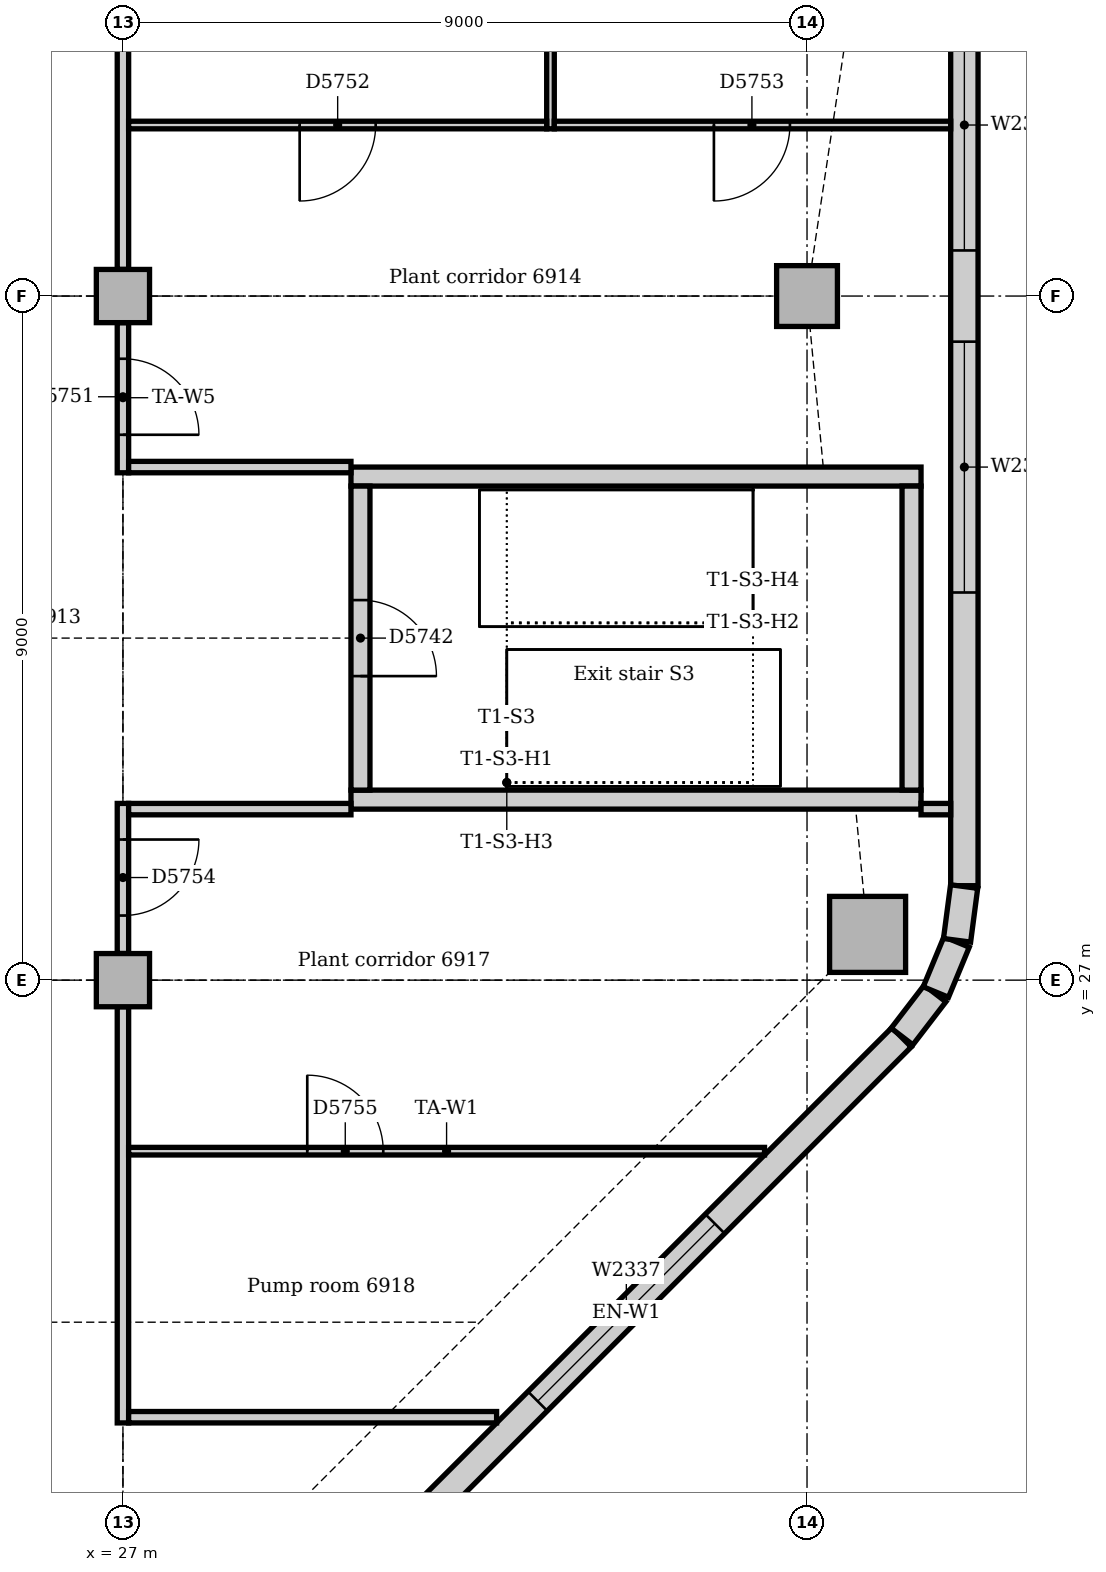
"""IFC4 building model, lengths in metres.
Left out: names, types, materials, properties, quantities, classifications, styles, units other than length and angle.
Written with IfcOpenShell. Run it as: python <this file> out.ifc"""

import sys

from ifc_helpers import new_model, si_unit, direction, frame, frame_2d, origin, origin_2d, place, context, subcontext, project, spatial, rectangle, extrude, element, fill, save


model = new_model("IFC4")
c1 = context("Model", 3, precision=1e-05, world=origin(), true_north=direction((0.0, 1.0)))
c2 = subcontext(c1, "Body", "Model", "MODEL_VIEW")
j1 = project(units=[si_unit("LENGTHUNIT", "METRE"), si_unit("PLANEANGLEUNIT", "RADIAN")], contexts=[c1])
p1 = place(None, origin())
s1 = spatial("IfcSite", under=j1, at=p1, CompositionType="ELEMENT")
p2 = place(p1, origin())
s2 = spatial("IfcBuilding", under=s1, at=p2, CompositionType="ELEMENT")
p3 = place(p2, frame((0.0, 0.0, 291.0)))
s3 = spatial("IfcBuildingStorey", under=s2, at=p3, CompositionType="ELEMENT", Elevation=291.0)
for number, where, z_axis, x_axis in (
    (1, (30.0, 29.375, 0.0), (0.0, 0.0, 1.0), (1.0, 0.0, 0.0)),
    (2, (37.5, 33.625, 0.0), (0.0, 0.0, 1.0), (-1.0, 0.0, 0.0)),
):
    element("IfcWall", number, at=place(p3, frame(where, z_axis=z_axis, x_axis=x_axis)), inside=s3, PredefinedType="SOLIDWALL", context=c2, shape_type="SweptSolid", body=[
        extrude(rectangle(XDim=7.5, YDim=0.25, at=frame_2d((3.75, 0.0))), origin(), (0.0, 0.0, 1.0), 6.55),
    ])
p4 = place(p3, frame((37.375, 29.5, 0.0), z_axis=(0.0, 0.0, 1.0), x_axis=(0.0, 1.0, 0.0)))
e3 = element("IfcWall", 3, at=p4, inside=s3, PredefinedType="SOLIDWALL", context=c2, shape_type="SweptSolid", body=[
    extrude(rectangle(XDim=4.0, YDim=0.25, at=frame_2d((2.0, 0.0))), origin(), (0.0, 0.0, 1.0), 6.55),
])
p5 = place(p3, frame((30.125, 33.5, 0.0), z_axis=(0.0, 0.0, 1.0), x_axis=(0.0, -1.0, 0.0)))
e4 = element("IfcWall", 4, at=p5, inside=s3, PredefinedType="SOLIDWALL", context=c2, shape_type="SweptSolid", body=[
    extrude(rectangle(XDim=4.0, YDim=0.25, at=frame_2d((2.0, 0.0))), origin(), (0.0, 0.0, 1.0), 6.55),
])
p6 = place(p5, frame((1.5, 0.0, 0.0)))
e5 = element("IfcOpeningElement", 5, at=p6, cuts=e4, PredefinedType="OPENING", context=c2, shape_type="SweptSolid", body=[
    extrude(rectangle(XDim=1.0, YDim=2.1, at=frame_2d((0.5, 1.05))), frame((0.0, 0.135, 0.0), z_axis=(0.0, -1.0, 0.0), x_axis=(1.0, 0.0, 0.0)), (0.0, 0.0, 1.0), 0.27),
])
p7 = place(p3, frame((36.797, 27.602, 0.0), z_axis=(0.0, 0.0, 1.0), x_axis=(1.0, 0.0, 0.0)))
e6 = element("IfcColumn", 6, at=p7, inside=s3, PredefinedType="COLUMN", context=c2, shape_type="SweptSolid", body=[
    extrude(rectangle(XDim=1.0, YDim=1.0, at=origin_2d()), origin(), (0.0, 0.0, 1.0), 6.55),
])
p8 = place(p3, frame((36.0, 36.0, 0.0), z_axis=(0.0, 0.0, 1.0), x_axis=(1.0, 0.0, 0.0)))
e7 = element("IfcColumn", 7, at=p8, inside=s3, PredefinedType="COLUMN", context=c2, shape_type="SweptSolid", body=[
    extrude(rectangle(XDim=0.8, YDim=0.8, at=origin_2d()), origin(), (0.0, 0.0, 1.0), 6.55),
])
for number, where, z_axis, x_axis in (
    (8, (27.0, 27.0, 0.0), (0.0, 0.0, 1.0), (1.0, 0.0, 0.0)),
    (9, (27.0, 36.0, 0.0), (0.0, 0.0, 1.0), (1.0, 0.0, 0.0)),
):
    element("IfcColumn", number, at=place(p3, frame(where, z_axis=z_axis, x_axis=x_axis)), inside=s3, PredefinedType="COLUMN", context=c2, shape_type="SweptSolid", body=[
        extrude(rectangle(XDim=0.7, YDim=0.7, at=origin_2d()), origin(), (0.0, 0.0, 1.0), 6.55),
    ])
p9 = place(p3, frame((30.001, 19.006, 0.0), z_axis=(0.0, 0.0, 1.0), x_axis=(0.707106781187, 0.707106781187, 0.0)))
e10 = element("IfcWall", 10, at=p9, inside=s3, PredefinedType="STANDARD", context=c2, shape_type="SweptSolid", body=[
    extrude(rectangle(XDim=10.243, YDim=0.36, at=frame_2d((5.121, 0.0))), origin(), (0.0, 0.0, 1.0), 6.55),
])
p10 = place(p9, frame((3.471, 0.0, 0.9)))
e11 = element("IfcOpeningElement", 11, at=p10, cuts=e10, PredefinedType="OPENING", context=c2, shape_type="SweptSolid", body=[
    extrude(rectangle(XDim=3.3, YDim=2.2, at=frame_2d((1.65, 1.1))), frame((0.0, 0.19, 0.0), z_axis=(0.0, -1.0, 0.0), x_axis=(1.0, 0.0, 0.0)), (0.0, 0.0, 1.0), 0.38),
])
p11 = place(p3, frame((38.07, 28.243, 0.0), z_axis=(0.0, 0.0, 1.0), x_axis=(0.0, 1.0, 0.0)))
e12 = element("IfcWall", 12, at=p11, inside=s3, PredefinedType="STANDARD", context=c2, shape_type="SweptSolid", body=[
    extrude(rectangle(XDim=24.515, YDim=0.36, at=frame_2d((12.257, 0.0))), origin(), (0.0, 0.0, 1.0), 6.55),
])
p12 = place(p11, frame((3.857, 0.0, 0.9)))
e13 = element("IfcOpeningElement", 13, at=p12, cuts=e12, PredefinedType="OPENING", context=c2, shape_type="SweptSolid", body=[
    extrude(rectangle(XDim=3.3, YDim=2.2, at=frame_2d((1.65, 1.1))), frame((0.0, 0.19, 0.0), z_axis=(0.0, -1.0, 0.0), x_axis=(1.0, 0.0, 0.0)), (0.0, 0.0, 1.0), 0.38),
])
p13 = place(p11, frame((8.357, 0.0, 0.9)))
e14 = element("IfcOpeningElement", 14, at=p13, cuts=e12, PredefinedType="OPENING", context=c2, shape_type="SweptSolid", body=[
    extrude(rectangle(XDim=3.3, YDim=2.2, at=frame_2d((1.65, 1.1))), frame((0.0, 0.19, 0.0), z_axis=(0.0, -1.0, 0.0), x_axis=(1.0, 0.0, 0.0)), (0.0, 0.0, 1.0), 0.38),
])
p14 = place(p11, frame((12.857, 0.0, 0.9)))
e15 = element("IfcOpeningElement", 15, at=p14, cuts=e12, PredefinedType="OPENING", context=c2, shape_type="SweptSolid", body=[
    extrude(rectangle(XDim=3.3, YDim=2.2, at=frame_2d((1.65, 1.1))), frame((0.0, 0.19, 0.0), z_axis=(0.0, -1.0, 0.0), x_axis=(1.0, 0.0, 0.0)), (0.0, 0.0, 1.0), 0.38),
])
p15 = place(p11, frame((17.357, 0.0, 0.9)))
e16 = element("IfcOpeningElement", 16, at=p15, cuts=e12, PredefinedType="OPENING", context=c2, shape_type="SweptSolid", body=[
    extrude(rectangle(XDim=3.3, YDim=2.2, at=frame_2d((1.65, 1.1))), frame((0.0, 0.19, 0.0), z_axis=(0.0, -1.0, 0.0), x_axis=(1.0, 0.0, 0.0)), (0.0, 0.0, 1.0), 0.38),
])
p16 = place(p3, frame((37.25, 26.259, 0.0), z_axis=(0.0, 0.0, 1.0), x_axis=(0.608802368033, 0.793321924995, 0.0)))
e17 = element("IfcWall", 17, at=p16, inside=s3, PredefinedType="STANDARD", context=c2, shape_type="SweptSolid", body=[
    extrude(rectangle(XDim=0.713, YDim=0.36, at=frame_2d((0.357, 0.0))), origin(), (0.0, 0.0, 1.0), 6.55),
])
for number, where, z_axis, x_axis in (
    (18, (37.695, 26.844, 0.0), (0.0, 0.0, 1.0), (0.383, 0.924, 0.0)),
    (19, (37.974, 27.524, 0.0), (0.0, 0.0, 1.0), (0.131, 0.991, 0.0)),
):
    element("IfcWall", number, at=place(p3, frame(where, z_axis=z_axis, x_axis=x_axis)), inside=s3, PredefinedType="STANDARD", context=c2, shape_type="SweptSolid", body=[
        extrude(rectangle(XDim=0.713, YDim=0.36, at=frame_2d((0.356, 0.0))), origin(), (0.0, 0.0, 1.0), 6.55),
    ])
p17 = place(p3, frame((27.0, 33.675, 0.0), z_axis=(0.0, 0.0, 1.0), x_axis=(0.0, 1.0, 0.0)))
e20 = element("IfcWall", 20, at=p17, inside=s3, PredefinedType="PARTITIONING", context=c2, shape_type="SweptSolid", body=[
    extrude(rectangle(XDim=1.975, YDim=0.15, at=frame_2d((0.988, 0.0))), origin(), (0.0, 0.0, 1.0), 5.75),
])
p18 = place(p17, frame((0.5, 0.0, 0.0)))
e21 = element("IfcOpeningElement", 21, at=p18, cuts=e20, PredefinedType="OPENING", context=c2, shape_type="SweptSolid", body=[
    extrude(rectangle(XDim=1.0, YDim=2.1, at=frame_2d((0.5, 1.05))), frame((0.0, 0.085, 0.0), z_axis=(0.0, -1.0, 0.0), x_axis=(1.0, 0.0, 0.0)), (0.0, 0.0, 1.0), 0.17),
])
p19 = place(p3, frame((27.0, 36.35, 0.0), z_axis=(0.0, 0.0, 1.0), x_axis=(0.0, 1.0, 0.0)))
e22 = element("IfcWall", 22, at=p19, inside=s3, PredefinedType="PARTITIONING", context=c2, shape_type="SweptSolid", body=[
    extrude(rectangle(XDim=7.4, YDim=0.15, at=frame_2d((3.7, 0.0))), origin(), (0.0, 0.0, 1.0), 6.1),
])
p20 = place(p3, frame((27.0, 21.175, 0.0), z_axis=(0.0, 0.0, 1.0), x_axis=(0.0, 1.0, 0.0)))
e23 = element("IfcWall", 23, at=p20, inside=s3, PredefinedType="PARTITIONING", context=c2, shape_type="SweptSolid", body=[
    extrude(rectangle(XDim=5.475, YDim=0.15, at=frame_2d((2.737, 0.0))), origin(), (0.0, 0.0, 1.0), 5.75),
])
p21 = place(p3, frame((27.0, 27.35, 0.0), z_axis=(0.0, 0.0, 1.0), x_axis=(0.0, 1.0, 0.0)))
e24 = element("IfcWall", 24, at=p21, inside=s3, PredefinedType="PARTITIONING", context=c2, shape_type="SweptSolid", body=[
    extrude(rectangle(XDim=1.975, YDim=0.15, at=frame_2d((0.988, 0.0))), origin(), (0.0, 0.0, 1.0), 5.75),
])
p22 = place(p21, frame((0.5, 0.0, 0.0)))
e25 = element("IfcOpeningElement", 25, at=p22, cuts=e24, PredefinedType="OPENING", context=c2, shape_type="SweptSolid", body=[
    extrude(rectangle(XDim=1.0, YDim=2.1, at=frame_2d((0.5, 1.05))), frame((0.0, 0.085, 0.0), z_axis=(0.0, -1.0, 0.0), x_axis=(1.0, 0.0, 0.0)), (0.0, 0.0, 1.0), 0.17),
])
p23 = place(p3, frame((27.075, 21.25, 0.0), z_axis=(0.0, 0.0, 1.0), x_axis=(1.0, 0.0, 0.0)))
e26 = element("IfcWall", 26, at=p23, inside=s3, PredefinedType="PARTITIONING", context=c2, shape_type="SweptSolid", body=[
    extrude(rectangle(XDim=4.841, YDim=0.15, at=frame_2d((2.421, 0.0))), origin(), (0.0, 0.0, 1.0), 6.55),
])
for number, where, z_axis, x_axis in (
    (27, (27.075, 29.25, 0.0), (0.0, 0.0, 1.0), (1.0, 0.0, 0.0)),
    (28, (27.075, 33.75, 0.0), (0.0, 0.0, 1.0), (1.0, 0.0, 0.0)),
):
    element("IfcWall", number, at=place(p3, frame(where, z_axis=z_axis, x_axis=x_axis)), inside=s3, PredefinedType="PARTITIONING", context=c2, shape_type="SweptSolid", body=[
        extrude(rectangle(XDim=2.925, YDim=0.15, at=frame_2d((1.462, 0.0))), origin(), (0.0, 0.0, 1.0), 6.55),
    ])
p24 = place(p3, frame((37.5, 29.25, 0.0), z_axis=(0.0, 0.0, 1.0), x_axis=(1.0, 0.0, 0.0)))
e29 = element("IfcWall", 29, at=p24, inside=s3, PredefinedType="PARTITIONING", context=c2, shape_type="SweptSolid", body=[
    extrude(rectangle(XDim=0.39, YDim=0.15, at=frame_2d((0.195, 0.0))), origin(), (0.0, 0.0, 1.0), 6.55),
])
p25 = place(p3, frame((32.625, 38.2, 0.0), z_axis=(0.0, 0.0, 1.0), x_axis=(0.0, 1.0, 0.0)))
e30 = element("IfcWall", 30, at=p25, inside=s3, PredefinedType="PARTITIONING", context=c2, shape_type="SweptSolid", body=[
    extrude(rectangle(XDim=20.966, YDim=0.1, at=frame_2d((10.483, 0.0))), origin(), (0.0, 0.0, 1.0), 6.55),
])
p26 = place(p3, frame((27.075, 38.25, 0.0), z_axis=(0.0, 0.0, 1.0), x_axis=(1.0, 0.0, 0.0)))
e31 = element("IfcWall", 31, at=p26, inside=s3, PredefinedType="PARTITIONING", context=c2, shape_type="SweptSolid", body=[
    extrude(rectangle(XDim=5.5, YDim=0.1, at=frame_2d((2.75, 0.0))), origin(), (0.0, 0.0, 1.0), 6.55),
])
p27 = place(p26, frame((2.25, 0.0, 0.0)))
e32 = element("IfcOpeningElement", 32, at=p27, cuts=e31, PredefinedType="OPENING", context=c2, shape_type="SweptSolid", body=[
    extrude(rectangle(XDim=1.0, YDim=2.1, at=frame_2d((0.5, 1.05))), frame((0.0, 0.06, 0.0), z_axis=(0.0, -1.0, 0.0), x_axis=(1.0, 0.0, 0.0)), (0.0, 0.0, 1.0), 0.12),
])
p28 = place(p3, frame((32.675, 38.25, 0.0), z_axis=(0.0, 0.0, 1.0), x_axis=(1.0, 0.0, 0.0)))
e33 = element("IfcWall", 33, at=p28, inside=s3, PredefinedType="PARTITIONING", context=c2, shape_type="SweptSolid", body=[
    extrude(rectangle(XDim=5.215, YDim=0.1, at=frame_2d((2.607, 0.0))), origin(), (0.0, 0.0, 1.0), 6.55),
])
p29 = place(p28, frame((2.1, 0.0, 0.0)))
e34 = element("IfcOpeningElement", 34, at=p29, cuts=e33, PredefinedType="OPENING", context=c2, shape_type="SweptSolid", body=[
    extrude(rectangle(XDim=1.0, YDim=2.1, at=frame_2d((0.5, 1.05))), frame((0.0, 0.06, 0.0), z_axis=(0.0, -1.0, 0.0), x_axis=(1.0, 0.0, 0.0)), (0.0, 0.0, 1.0), 0.12),
])
p30 = place(p3, frame((27.075, 24.75, 0.0), z_axis=(0.0, 0.0, 1.0), x_axis=(1.0, 0.0, 0.0)))
e35 = element("IfcWall", 35, at=p30, inside=s3, PredefinedType="PARTITIONING", context=c2, shape_type="SweptSolid", body=[
    extrude(rectangle(XDim=8.366, YDim=0.1, at=frame_2d((4.183, 0.0))), origin(), (0.0, 0.0, 1.0), 6.55),
])
p31 = place(p30, frame((2.35, 0.0, 0.0)))
e36 = element("IfcOpeningElement", 36, at=p31, cuts=e35, PredefinedType="OPENING", context=c2, shape_type="SweptSolid", body=[
    extrude(rectangle(XDim=1.0, YDim=2.1, at=frame_2d((0.5, 1.05))), frame((0.0, 0.06, 0.0), z_axis=(0.0, -1.0, 0.0), x_axis=(1.0, 0.0, 0.0)), (0.0, 0.0, 1.0), 0.12),
])
p32 = place(p10, origin())
e37 = element("IfcWindow", 37, at=p32, inside=s3, PartitioningType="SINGLE_PANEL", PredefinedType="WINDOW", context=c2, shape_type="SweptSolid", body=[
    extrude(rectangle(XDim=3.3, YDim=2.2, at=frame_2d((1.65, 1.1))), frame((0.0, 0.13, 0.0), z_axis=(0.0, -1.0, 0.0), x_axis=(1.0, 0.0, 0.0)), (0.0, 0.0, 1.0), 0.06),
])
fill(e11, e37)
p33 = place(p12, origin())
e38 = element("IfcWindow", 38, at=p33, inside=s3, PartitioningType="SINGLE_PANEL", PredefinedType="WINDOW", context=c2, shape_type="SweptSolid", body=[
    extrude(rectangle(XDim=3.3, YDim=2.2, at=frame_2d((1.65, 1.1))), frame((0.0, 0.13, 0.0), z_axis=(0.0, -1.0, 0.0), x_axis=(1.0, 0.0, 0.0)), (0.0, 0.0, 1.0), 0.06),
])
fill(e13, e38)
p34 = place(p13, origin())
e39 = element("IfcWindow", 39, at=p34, inside=s3, PartitioningType="SINGLE_PANEL", PredefinedType="WINDOW", context=c2, shape_type="SweptSolid", body=[
    extrude(rectangle(XDim=3.3, YDim=2.2, at=frame_2d((1.65, 1.1))), frame((0.0, 0.13, 0.0), z_axis=(0.0, -1.0, 0.0), x_axis=(1.0, 0.0, 0.0)), (0.0, 0.0, 1.0), 0.06),
])
fill(e14, e39)
p35 = place(p6, origin())
e40 = element("IfcDoor", 40, at=p35, inside=s3, OperationType="SINGLE_SWING_RIGHT", PredefinedType="DOOR", context=c2, shape_type="SweptSolid", body=[
    extrude(rectangle(XDim=1.0, YDim=2.1, at=frame_2d((0.5, 1.05))), frame((0.0, 0.025, 0.0), z_axis=(0.0, -1.0, 0.0), x_axis=(1.0, 0.0, 0.0)), (0.0, 0.0, 1.0), 0.05),
])
fill(e5, e40)
p36 = place(p18, frame((1.0, 0.0, 0.0), z_axis=(0.0, 0.0, 1.0), x_axis=(-1.0, 0.0, 0.0)))
e41 = element("IfcDoor", 41, at=p36, inside=s3, OperationType="SINGLE_SWING_RIGHT", PredefinedType="DOOR", context=c2, shape_type="SweptSolid", body=[
    extrude(rectangle(XDim=1.0, YDim=2.1, at=frame_2d((0.5, 1.05))), frame((0.0, 0.025, 0.0), z_axis=(0.0, -1.0, 0.0), x_axis=(1.0, 0.0, 0.0)), (0.0, 0.0, 1.0), 0.05),
])
fill(e21, e41)
p37 = place(p27, frame((1.0, 0.0, 0.0), z_axis=(0.0, 0.0, 1.0), x_axis=(-1.0, 0.0, 0.0)))
e42 = element("IfcDoor", 42, at=p37, inside=s3, OperationType="SINGLE_SWING_RIGHT", PredefinedType="DOOR", context=c2, shape_type="SweptSolid", body=[
    extrude(rectangle(XDim=1.0, YDim=2.1, at=frame_2d((0.5, 1.05))), frame((0.0, 0.025, 0.0), z_axis=(0.0, -1.0, 0.0), x_axis=(1.0, 0.0, 0.0)), (0.0, 0.0, 1.0), 0.05),
])
fill(e32, e42)
p38 = place(p29, frame((1.0, 0.0, 0.0), z_axis=(0.0, 0.0, 1.0), x_axis=(-1.0, 0.0, 0.0)))
e43 = element("IfcDoor", 43, at=p38, inside=s3, OperationType="SINGLE_SWING_RIGHT", PredefinedType="DOOR", context=c2, shape_type="SweptSolid", body=[
    extrude(rectangle(XDim=1.0, YDim=2.1, at=frame_2d((0.5, 1.05))), frame((0.0, 0.025, 0.0), z_axis=(0.0, -1.0, 0.0), x_axis=(1.0, 0.0, 0.0)), (0.0, 0.0, 1.0), 0.05),
])
fill(e34, e43)
p39 = place(p22, frame((1.0, 0.0, 0.0), z_axis=(0.0, 0.0, 1.0), x_axis=(-1.0, 0.0, 0.0)))
e44 = element("IfcDoor", 44, at=p39, inside=s3, OperationType="SINGLE_SWING_LEFT", PredefinedType="DOOR", context=c2, shape_type="SweptSolid", body=[
    extrude(rectangle(XDim=1.0, YDim=2.1, at=frame_2d((0.5, 1.05))), frame((0.0, 0.025, 0.0), z_axis=(0.0, -1.0, 0.0), x_axis=(1.0, 0.0, 0.0)), (0.0, 0.0, 1.0), 0.05),
])
fill(e25, e44)
p40 = place(p31, origin())
e45 = element("IfcDoor", 45, at=p40, inside=s3, OperationType="SINGLE_SWING_LEFT", PredefinedType="DOOR", context=c2, shape_type="SweptSolid", body=[
    extrude(rectangle(XDim=1.0, YDim=2.1, at=frame_2d((0.5, 1.05))), frame((0.0, 0.025, 0.0), z_axis=(0.0, -1.0, 0.0), x_axis=(1.0, 0.0, 0.0)), (0.0, 0.0, 1.0), 0.05),
])
fill(e36, e45)
save(model, sys.argv[1])
